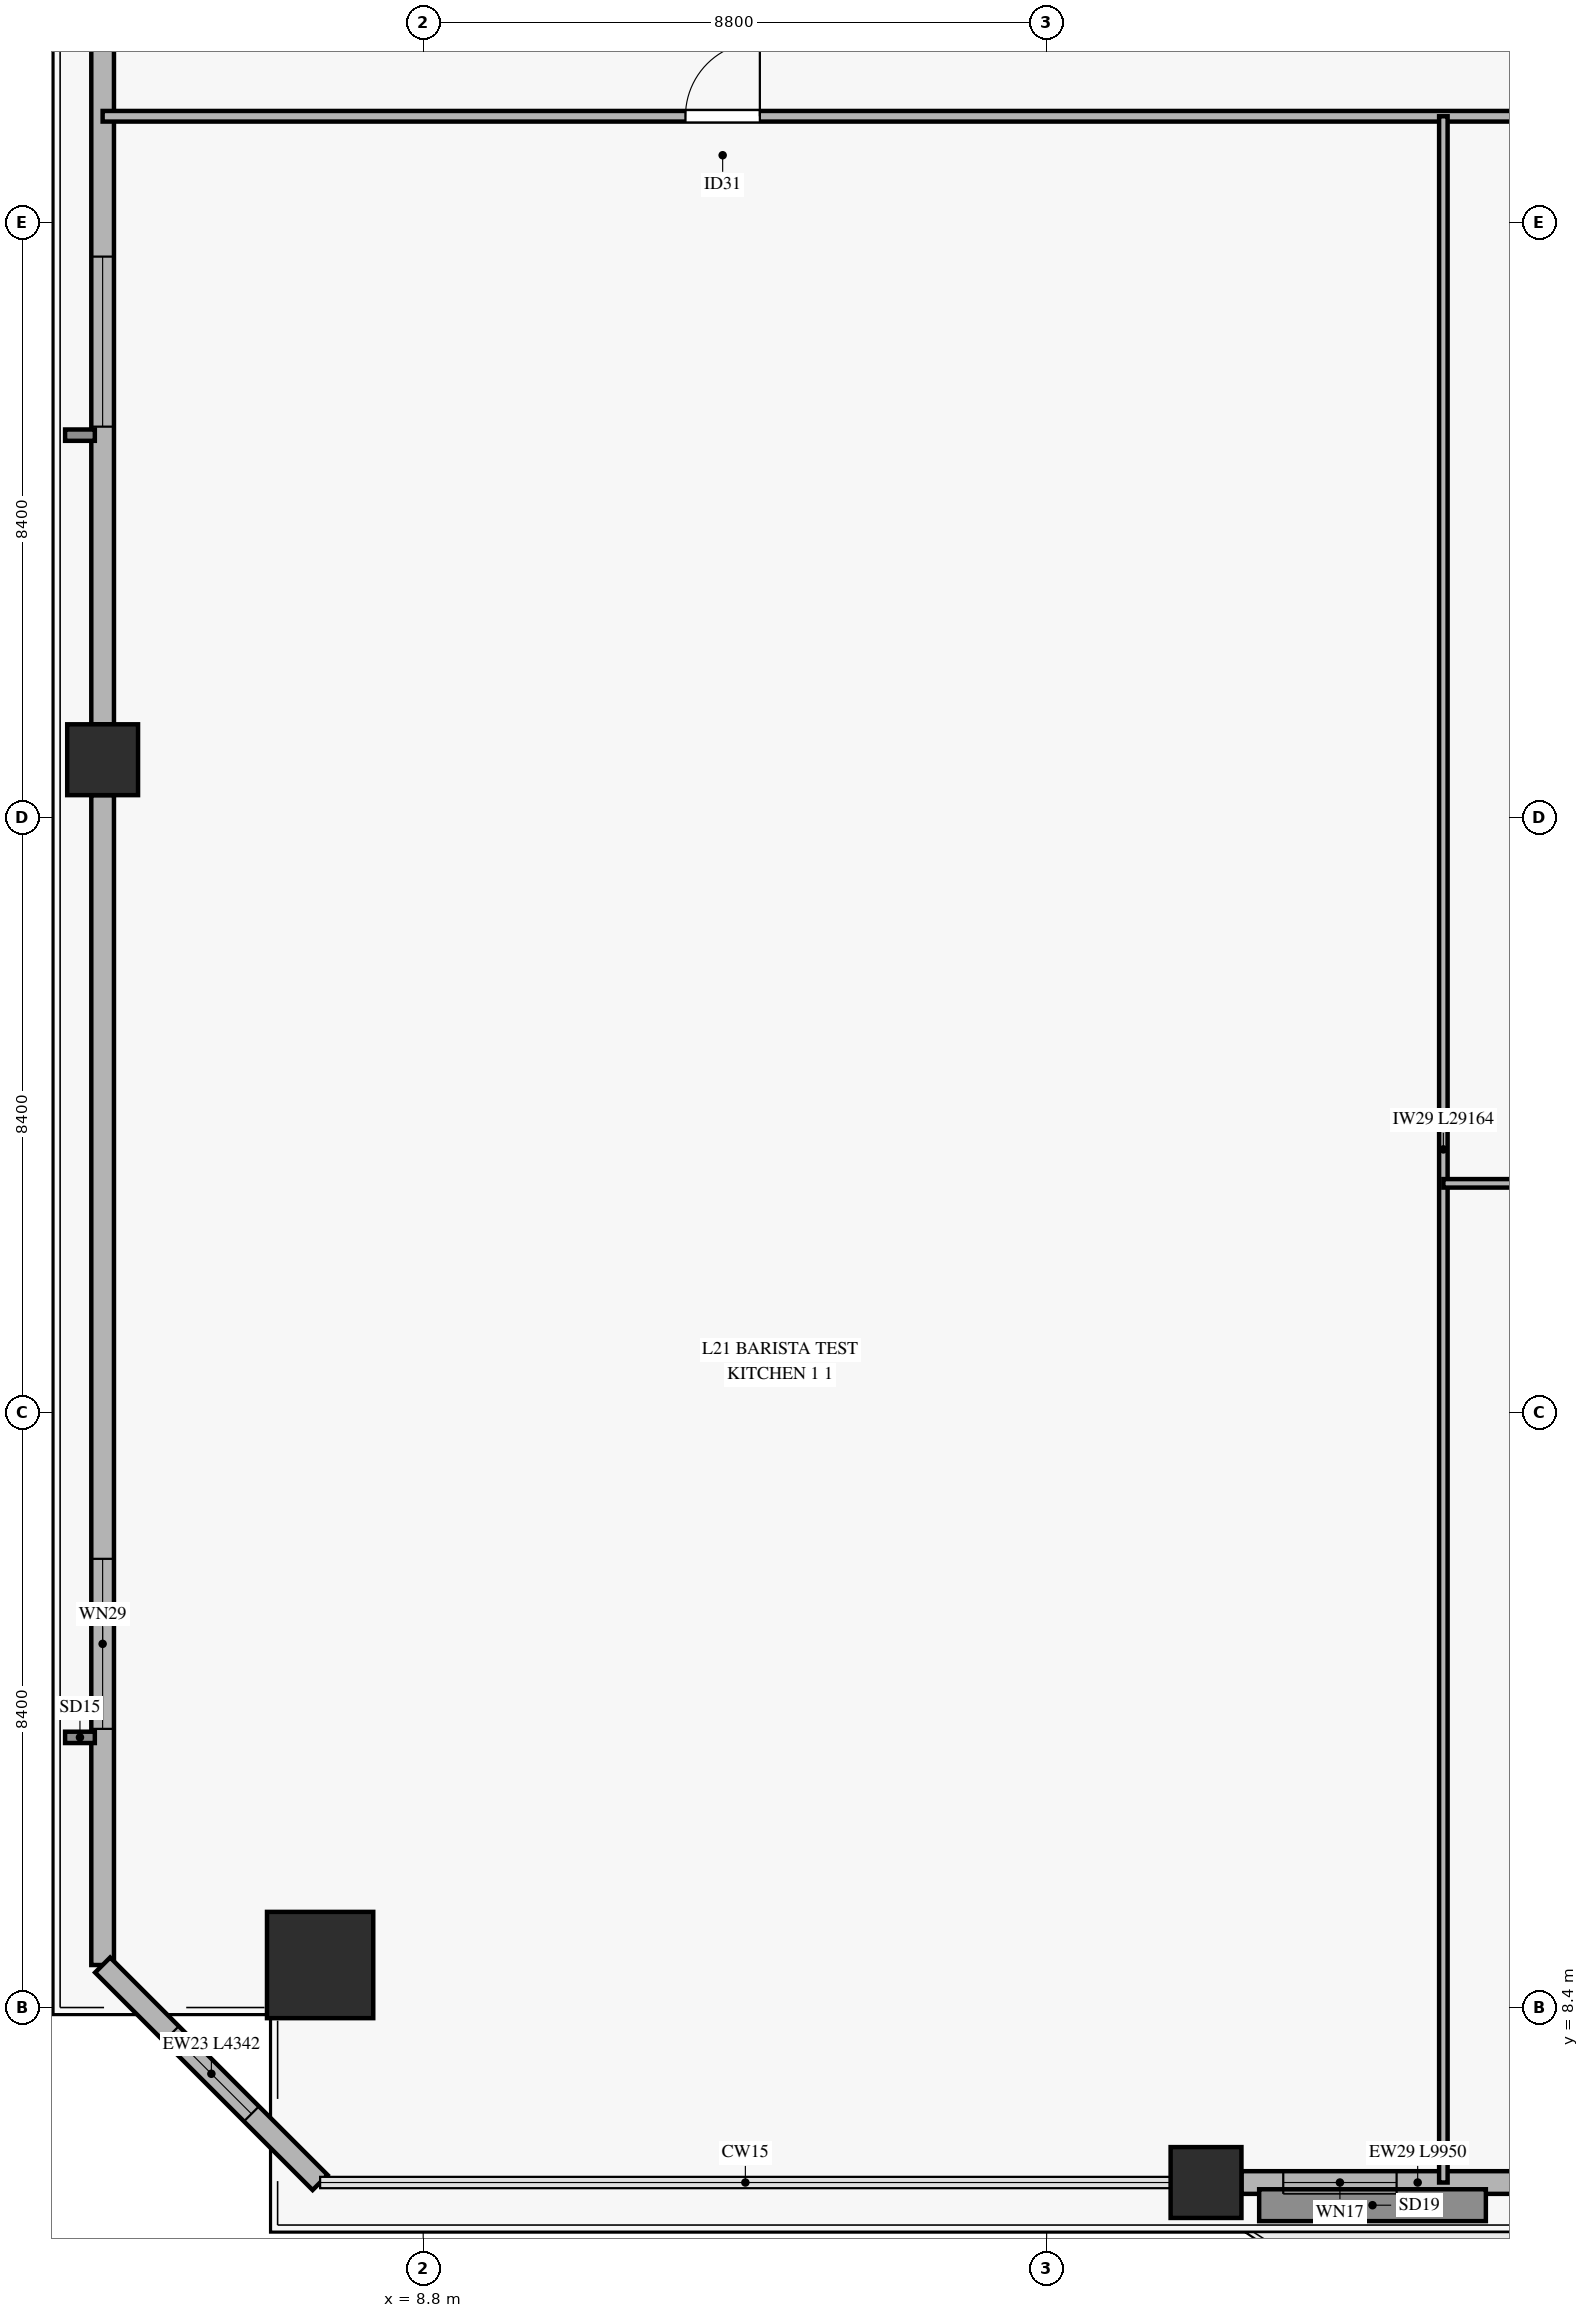
"""IFC4 building model, lengths in metres.
Left out: names, types, materials, properties, quantities, classifications, styles, units other than length and angle.
Written with IfcOpenShell. Run it as: python <this file> out.ifc"""

import sys

from ifc_helpers import new_model, si_unit, direction, frame, frame_2d, origin, origin_2d, place, context, subcontext, project, spatial, rectangle, hollow_rectangle, extrude, source, transform, mapped, element, fill, save


model = new_model("IFC4")
c1 = context("Model", 3, precision=1e-05, world=origin(), true_north=direction((0.0, 1.0)))
c2 = subcontext(c1, "Body", "Model", "MODEL_VIEW")
j1 = project(units=[si_unit("LENGTHUNIT", "METRE"), si_unit("PLANEANGLEUNIT", "RADIAN")], contexts=[c1])
p1 = place(None, origin())
s1 = spatial("IfcSite", under=j1, at=p1, CompositionType="ELEMENT")
p2 = place(p1, origin())
s2 = spatial("IfcBuilding", under=s1, at=p2, CompositionType="ELEMENT")
p3 = place(p2, frame((0.0, 0.0, 87.4)))
s3 = spatial("IfcBuildingStorey", under=s2, at=p3, CompositionType="ELEMENT", Elevation=87.4)
m1 = source(origin(), c2, "Body", "SweptSolid", [
    extrude(hollow_rectangle(XDim=1.5, YDim=1.5, WallThickness=0.07, at=origin_2d()), origin(), (0.0, 0.0, 1.0), 3.68),
])
p4 = place(p3, frame((7.345, 9.006, 0.0), z_axis=(0.0, 0.0, 1.0), x_axis=(1.0, 0.0, 0.0)))
e1 = element("IfcColumn", 1, at=p4, inside=s3, PredefinedType="COLUMN", context=c2, shape_type="MappedRepresentation", body=[
    mapped(m1, transform((0.0, 0.0, 0.0), x_axis=(1.0, 0.0, 0.0), y_axis=(0.0, 1.0, 0.0), z_axis=(0.0, 0.0, 1.0), scale=1.0)),
])
m2 = source(origin(), c2, "Body", "SweptSolid", [
    extrude(hollow_rectangle(XDim=1.0, YDim=1.0, WallThickness=0.045, at=origin_2d()), origin(), (0.0, 0.0, 1.0), 3.68),
])
for number, where, z_axis, x_axis in (
    (2, (19.85, 5.936, 0.0), (0.0, 0.0, 1.0), (1.0, 0.0, 0.0)),
    (3, (4.275, 26.018, 0.0), (0.0, 0.0, 1.0), (1.0, 0.0, 0.0)),
):
    element("IfcColumn", number, at=place(p3, frame(where, z_axis=z_axis, x_axis=x_axis)), inside=s3, PredefinedType="COLUMN", context=c2, shape_type="MappedRepresentation", body=[
        mapped(m2, transform((0.0, 0.0, 0.0), x_axis=(1.0, 0.0, 0.0), y_axis=(0.0, 1.0, 0.0), z_axis=(0.0, 0.0, 1.0), scale=1.0)),
    ])
p5 = place(p3, frame((20.35, 5.936, 0.0), z_axis=(0.0, 0.0, 1.0), x_axis=(1.0, 0.0, 0.0)))
e4 = element("IfcWall", 4, at=p5, inside=s3, PredefinedType="SOLIDWALL", context=c2, shape_type="SweptSolid", body=[
    extrude(rectangle(XDim=9.95, YDim=0.32, at=frame_2d((4.975, 0.0))), origin(), (0.0, 0.0, 1.0), 3.16),
])
p6 = place(p5, frame((4.05, 0.0, 0.0)))
e5 = element("IfcOpeningElement", 5, at=p6, cuts=e4, PredefinedType="OPENING", context=c2, shape_type="SweptSolid", body=[
    extrude(rectangle(XDim=1.8, YDim=2.25, at=frame_2d((0.9, 1.125))), frame((0.0, 0.17, 0.0), z_axis=(0.0, -1.0, 0.0), x_axis=(1.0, 0.0, 0.0)), (0.0, 0.0, 1.0), 0.34),
])
p7 = place(p5, frame((0.59, 0.0, 0.45)))
e6 = element("IfcOpeningElement", 6, at=p7, cuts=e4, PredefinedType="OPENING", context=c2, shape_type="SweptSolid", body=[
    extrude(rectangle(XDim=1.6, YDim=2.0, at=frame_2d((0.8, 1.0))), frame((0.0, 0.17, 0.0), z_axis=(0.0, -1.0, 0.0), x_axis=(1.0, 0.0, 0.0)), (0.0, 0.0, 1.0), 0.34),
])
p8 = place(p5, frame((7.35, 0.0, 0.45)))
e7 = element("IfcOpeningElement", 7, at=p8, cuts=e4, PredefinedType="OPENING", context=c2, shape_type="SweptSolid", body=[
    extrude(rectangle(XDim=1.6, YDim=2.0, at=frame_2d((0.8, 1.0))), frame((0.0, 0.17, 0.0), z_axis=(0.0, -1.0, 0.0), x_axis=(1.0, 0.0, 0.0)), (0.0, 0.0, 1.0), 0.34),
])
p9 = place(p3, frame((4.275, 9.006, 0.0), z_axis=(0.0, 0.0, 1.0), x_axis=(0.0, 1.0, 0.0)))
e8 = element("IfcWall", 8, at=p9, inside=s3, PredefinedType="SOLIDWALL", context=c2, shape_type="SweptSolid", body=[
    extrude(rectangle(XDim=16.512, YDim=0.32, at=frame_2d((8.256, 0.0))), origin(), (0.0, 0.0, 1.0), 3.16),
])
p10 = place(p9, frame((3.333, 0.0, 0.45)))
e9 = element("IfcOpeningElement", 9, at=p10, cuts=e8, PredefinedType="OPENING", context=c2, shape_type="SweptSolid", body=[
    extrude(rectangle(XDim=2.4, YDim=2.1, at=frame_2d((1.2, 1.05))), frame((0.0, 0.17, 0.0), z_axis=(0.0, -1.0, 0.0), x_axis=(1.0, 0.0, 0.0)), (0.0, 0.0, 1.0), 0.34),
])
p11 = place(p3, frame((4.275, 26.518, 0.0), z_axis=(0.0, 0.0, 1.0), x_axis=(0.0, 1.0, 0.0)))
e10 = element("IfcWall", 10, at=p11, inside=s3, PredefinedType="SOLIDWALL", context=c2, shape_type="SweptSolid", body=[
    extrude(rectangle(XDim=16.512, YDim=0.32, at=frame_2d((8.256, 0.0))), origin(), (0.0, 0.0, 1.0), 3.16),
])
p12 = place(p11, frame((4.201, 0.0, 0.45)))
e11 = element("IfcOpeningElement", 11, at=p12, cuts=e10, PredefinedType="OPENING", context=c2, shape_type="SweptSolid", body=[
    extrude(rectangle(XDim=2.4, YDim=2.1, at=frame_2d((1.2, 1.05))), frame((0.0, 0.17, 0.0), z_axis=(0.0, -1.0, 0.0), x_axis=(1.0, 0.0, 0.0)), (0.0, 0.0, 1.0), 0.34),
])
p13 = place(p3, frame((4.275, 9.006, 0.0), z_axis=(0.0, 0.0, 1.0), x_axis=(0.707106781187, -0.707106781187, 0.0)))
e12 = element("IfcWall", 12, at=p13, inside=s3, PredefinedType="SOLIDWALL", context=c2, shape_type="SweptSolid", body=[
    extrude(rectangle(XDim=4.342, YDim=0.3, at=frame_2d((2.171, 0.0))), origin(), (0.0, 0.0, 1.0), 3.16),
])
p14 = place(p13, frame((1.371, 0.0, 0.45)))
e13 = element("IfcOpeningElement", 13, at=p14, cuts=e12, PredefinedType="OPENING", context=c2, shape_type="SweptSolid", body=[
    extrude(rectangle(XDim=1.6, YDim=2.0, at=frame_2d((0.8, 1.0))), frame((0.0, 0.16, 0.0), z_axis=(0.0, -1.0, 0.0), x_axis=(1.0, 0.0, 0.0)), (0.0, 0.0, 1.0), 0.32),
])
p15 = place(p3, frame((4.275, 35.1, 0.0), z_axis=(0.0, 0.0, 1.0), x_axis=(1.0, 0.0, 0.0)))
e14 = element("IfcWall", 14, at=p15, inside=s3, PredefinedType="PARTITIONING", context=c2, shape_type="SweptSolid", body=[
    extrude(rectangle(XDim=61.851, YDim=0.15, at=frame_2d((30.926, 0.0))), origin(), (0.0, 0.0, 1.0), 2.765),
])
p16 = place(p15, frame((8.227, 0.0, 0.0)))
e15 = element("IfcOpeningElement", 15, at=p16, cuts=e14, PredefinedType="OPENING", context=c2, shape_type="SweptSolid", body=[
    extrude(rectangle(XDim=1.05, YDim=2.15, at=frame_2d((0.525, 1.075))), frame((0.0, 0.085, 0.0), z_axis=(0.0, -1.0, 0.0), x_axis=(1.0, 0.0, 0.0)), (0.0, 0.0, 1.0), 0.17),
])
p17 = place(p15, frame((21.731, 0.0, 0.0)))
e16 = element("IfcOpeningElement", 16, at=p17, cuts=e14, PredefinedType="OPENING", context=c2, shape_type="SweptSolid", body=[
    extrude(rectangle(XDim=1.05, YDim=2.15, at=frame_2d((0.525, 1.075))), frame((0.0, 0.085, 0.0), z_axis=(0.0, -1.0, 0.0), x_axis=(1.0, 0.0, 0.0)), (0.0, 0.0, 1.0), 0.17),
])
p18 = place(p15, frame((28.411, 0.0, 0.0)))
e17 = element("IfcOpeningElement", 17, at=p18, cuts=e14, PredefinedType="OPENING", context=c2, shape_type="SweptSolid", body=[
    extrude(rectangle(XDim=1.05, YDim=2.15, at=frame_2d((0.525, 1.075))), frame((0.0, 0.085, 0.0), z_axis=(0.0, -1.0, 0.0), x_axis=(1.0, 0.0, 0.0)), (0.0, 0.0, 1.0), 0.17),
])
p19 = place(p15, frame((35.371, 0.0, 0.0)))
e18 = element("IfcOpeningElement", 18, at=p19, cuts=e14, PredefinedType="OPENING", context=c2, shape_type="SweptSolid", body=[
    extrude(rectangle(XDim=1.05, YDim=2.15, at=frame_2d((0.525, 1.075))), frame((0.0, 0.085, 0.0), z_axis=(0.0, -1.0, 0.0), x_axis=(1.0, 0.0, 0.0)), (0.0, 0.0, 1.0), 0.17),
])
p20 = place(p15, frame((48.981, 0.0, 0.0)))
e19 = element("IfcOpeningElement", 19, at=p20, cuts=e14, PredefinedType="OPENING", context=c2, shape_type="SweptSolid", body=[
    extrude(rectangle(XDim=1.05, YDim=2.15, at=frame_2d((0.525, 1.075))), frame((0.0, 0.085, 0.0), z_axis=(0.0, -1.0, 0.0), x_axis=(1.0, 0.0, 0.0)), (0.0, 0.0, 1.0), 0.17),
])
p21 = place(p3, frame((23.2, 5.936, 0.0), z_axis=(0.0, 0.0, 1.0), x_axis=(0.0, 1.0, 0.0)))
e20 = element("IfcWall", 20, at=p21, inside=s3, PredefinedType="PARTITIONING", context=c2, shape_type="SweptSolid", body=[
    extrude(rectangle(XDim=29.164, YDim=0.12, at=frame_2d((14.582, 0.0))), origin(), (0.0, 0.0, 1.0), 3.165),
])
p22 = place(p3, frame((23.2, 20.039, 0.0), z_axis=(0.0, 0.0, 1.0), x_axis=(1.0, 0.0, 0.0)))
e21 = element("IfcWall", 21, at=p22, inside=s3, PredefinedType="PARTITIONING", context=c2, shape_type="SweptSolid", body=[
    extrude(rectangle(XDim=6.6, YDim=0.12, at=frame_2d((3.3, 0.0))), origin(), (0.0, 0.0, 1.0), 3.68),
])
p23 = place(p22, frame((2.935, 0.0, 0.0)))
e22 = element("IfcOpeningElement", 22, at=p23, cuts=e21, PredefinedType="OPENING", context=c2, shape_type="SweptSolid", body=[
    extrude(rectangle(XDim=0.95, YDim=2.1, at=frame_2d((0.475, 1.05))), frame((0.0, 0.07, 0.0), z_axis=(0.0, -1.0, 0.0), x_axis=(1.0, 0.0, 0.0)), (0.0, 0.0, 1.0), 0.14),
])
m3 = source(origin(), c2, "Body", "SweptSolid", [
    extrude(rectangle(XDim=1.6, YDim=2.0, at=frame_2d((0.8, 1.0))), frame((0.0, 0.03, 0.0), z_axis=(0.0, -1.0, 0.0), x_axis=(1.0, 0.0, 0.0)), (0.0, 0.0, 1.0), 0.06),
])
p24 = place(p7, origin())
e23 = element("IfcWindow", 23, at=p24, inside=s3, PartitioningType="SINGLE_PANEL", PredefinedType="WINDOW", context=c2, shape_type="MappedRepresentation", body=[
    mapped(m3, transform((0.0, 0.0, 0.0), x_axis=(1.0, 0.0, 0.0), y_axis=(0.0, 1.0, 0.0), z_axis=(0.0, 0.0, 1.0), scale=1.0)),
])
fill(e6, e23)
m4 = source(origin(), c2, "Body", "SweptSolid", [
    extrude(rectangle(XDim=2.4, YDim=2.1, at=frame_2d((1.2, 1.05))), frame((0.0, 0.03, 0.0), z_axis=(0.0, -1.0, 0.0), x_axis=(1.0, 0.0, 0.0)), (0.0, 0.0, 1.0), 0.06),
])
p25 = place(p10, origin())
e24 = element("IfcWindow", 24, at=p25, inside=s3, PartitioningType="SINGLE_PANEL", PredefinedType="WINDOW", context=c2, shape_type="MappedRepresentation", body=[
    mapped(m4, transform((0.0, 0.0, 0.0), x_axis=(1.0, 0.0, 0.0), y_axis=(0.0, 1.0, 0.0), z_axis=(0.0, 0.0, 1.0), scale=1.0)),
])
fill(e9, e24)
p26 = place(p12, origin())
e25 = element("IfcWindow", 25, at=p26, inside=s3, PartitioningType="SINGLE_PANEL", PredefinedType="WINDOW", context=c2, shape_type="MappedRepresentation", body=[
    mapped(m4, transform((0.0, 0.0, 0.0), x_axis=(1.0, 0.0, 0.0), y_axis=(0.0, 1.0, 0.0), z_axis=(0.0, 0.0, 1.0), scale=1.0)),
])
fill(e11, e25)
p27 = place(p14, origin())
e26 = element("IfcWindow", 26, at=p27, inside=s3, PartitioningType="SINGLE_PANEL", PredefinedType="WINDOW", context=c2, shape_type="MappedRepresentation", body=[
    mapped(m3, transform((0.0, 0.0, 0.0), x_axis=(1.0, 0.0, 0.0), y_axis=(0.0, 1.0, 0.0), z_axis=(0.0, 0.0, 1.0), scale=1.0)),
])
fill(e13, e26)
m5 = source(origin(), c2, "Body", "SweptSolid", [
    extrude(rectangle(XDim=1.05, YDim=2.15, at=frame_2d((0.525, 1.075))), frame((0.0, 0.025, 0.0), z_axis=(0.0, -1.0, 0.0), x_axis=(1.0, 0.0, 0.0)), (0.0, 0.0, 1.0), 0.05),
])
p28 = place(p16, origin())
e27 = element("IfcDoor", 27, at=p28, inside=s3, OperationType="SINGLE_SWING_RIGHT", PredefinedType="DOOR", context=c2, shape_type="MappedRepresentation", body=[
    mapped(m5, transform((0.0, 0.0, 0.0), x_axis=(1.0, 0.0, 0.0), y_axis=(0.0, 1.0, 0.0), z_axis=(0.0, 0.0, 1.0), scale=1.0)),
])
fill(e15, e27)
save(model, sys.argv[1])
